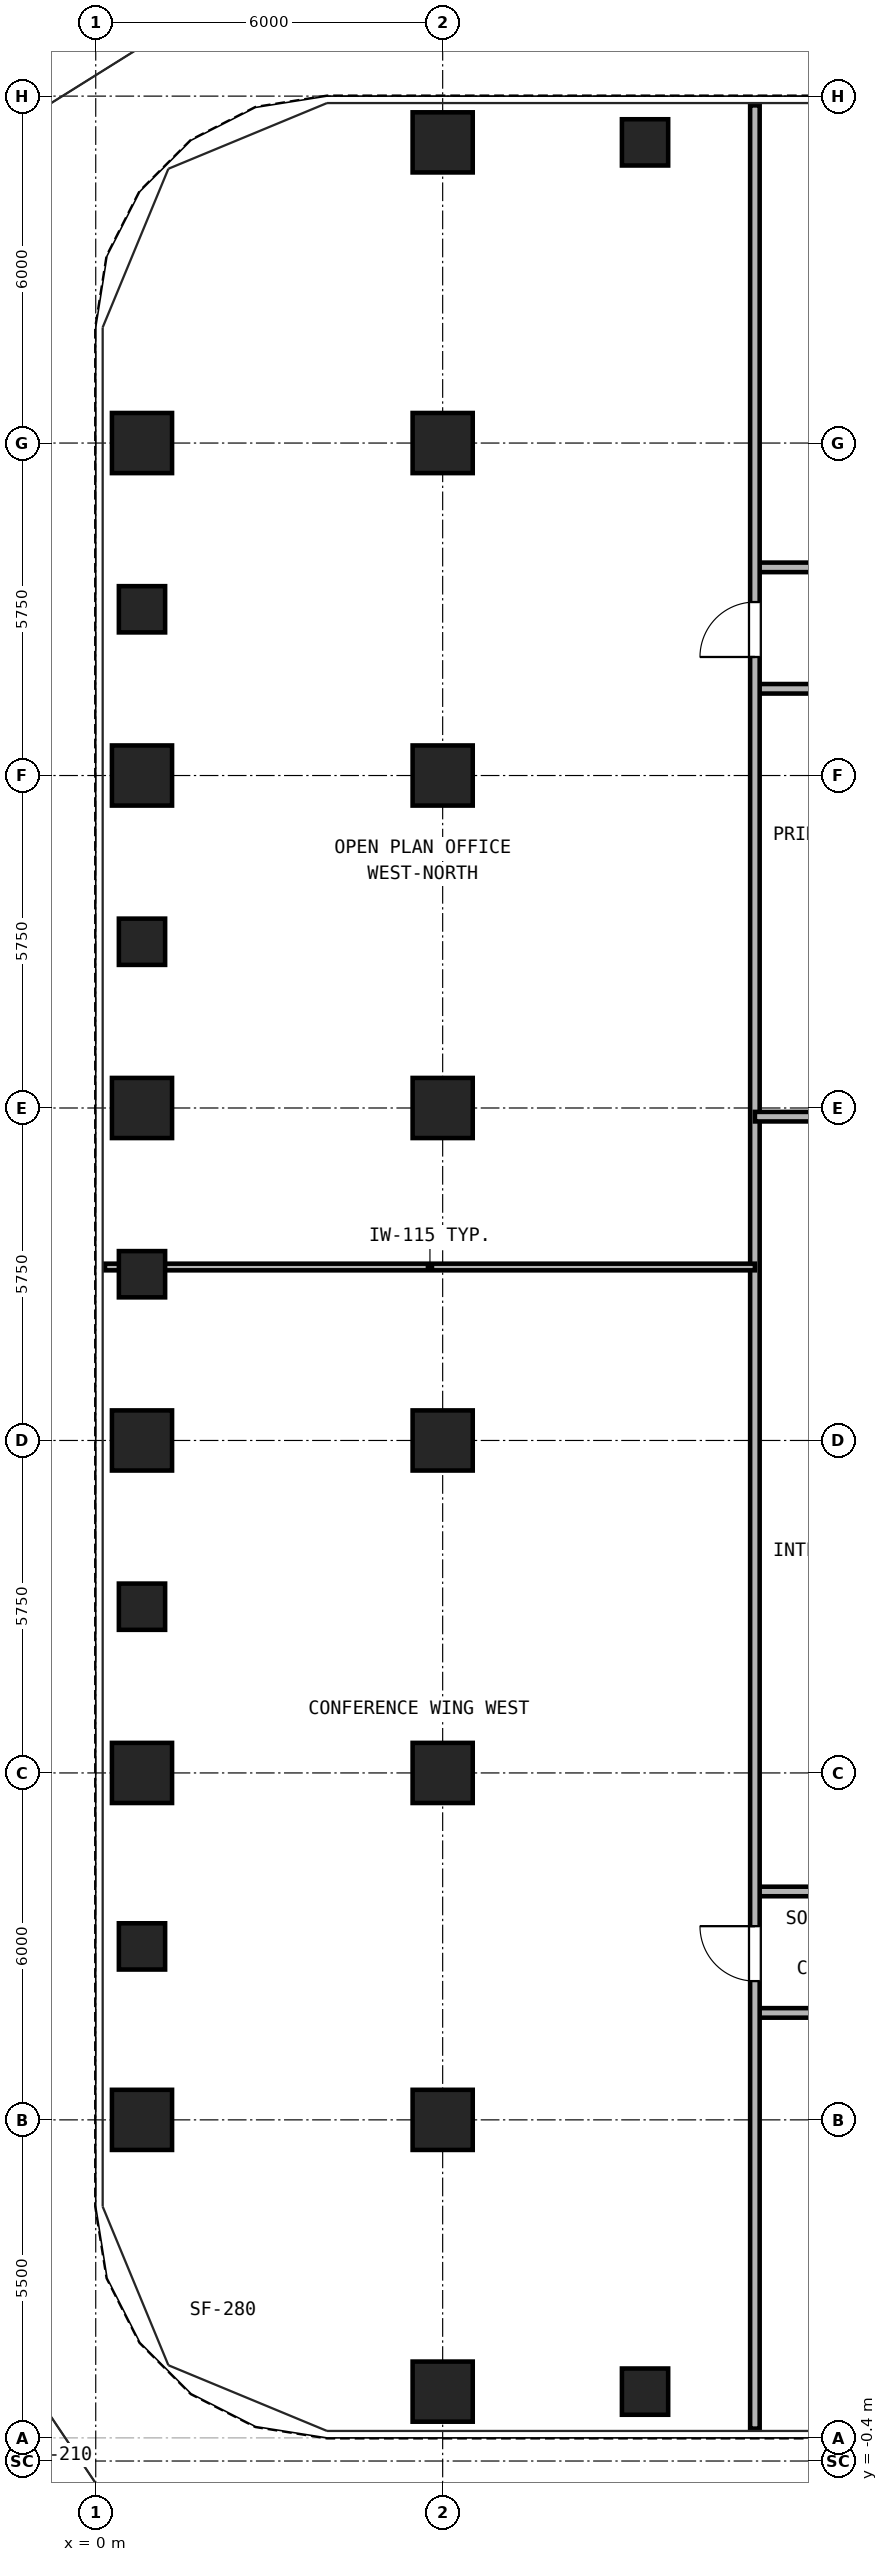
"""IFC4 building model, lengths in metres.
Left out: names, types, materials, properties, quantities, classifications, styles, units other than length and angle.
Written with IfcOpenShell. Run it as: python <this file> out.ifc"""

import sys

from ifc_helpers import new_model, si_unit, direction, frame, frame_2d, origin, origin_2d, place, context, subcontext, project, spatial, rectangle, hollow_rectangle, extrude, source, transform, mapped, element, fill, save


model = new_model("IFC4")
c1 = context("Model", 3, precision=1e-05, world=origin(), true_north=direction((0.0, 1.0)))
c2 = subcontext(c1, "Body", "Model", "MODEL_VIEW")
j1 = project(units=[si_unit("LENGTHUNIT", "METRE"), si_unit("PLANEANGLEUNIT", "RADIAN")], contexts=[c1])
p1 = place(None, origin())
s1 = spatial("IfcSite", under=j1, at=p1, CompositionType="ELEMENT")
p2 = place(p1, origin())
s2 = spatial("IfcBuilding", under=s1, at=p2, CompositionType="ELEMENT")
p3 = place(p2, frame((0.0, 0.0, 33.3)))
s3 = spatial("IfcBuildingStorey", under=s2, at=p3, CompositionType="ELEMENT", Elevation=33.3)
m1 = source(origin(), c2, "Body", "SweptSolid", [
    extrude(hollow_rectangle(XDim=1.04, YDim=1.04, WallThickness=0.065, at=origin_2d()), origin(), (0.0, 0.0, 1.0), 3.32),
])
for number, where, z_axis, x_axis in (
    (1, (6.0, 0.8, 0.0), (0.0, 0.0, 1.0), (1.0, 0.0, 0.0)),
    (2, (6.0, 39.7, 0.0), (0.0, 0.0, 1.0), (1.0, 0.0, 0.0)),
    (3, (0.8, 5.5, 0.0), (0.0, 0.0, 1.0), (1.0, 0.0, 0.0)),
    (4, (0.8, 11.5, 0.0), (0.0, 0.0, 1.0), (1.0, 0.0, 0.0)),
    (5, (0.8, 17.25, 0.0), (0.0, 0.0, 1.0), (1.0, 0.0, 0.0)),
    (6, (0.8, 23.0, 0.0), (0.0, 0.0, 1.0), (1.0, 0.0, 0.0)),
    (7, (0.8, 28.75, 0.0), (0.0, 0.0, 1.0), (1.0, 0.0, 0.0)),
    (8, (0.8, 34.5, 0.0), (0.0, 0.0, 1.0), (1.0, 0.0, 0.0)),
    (9, (6.0, 5.5, 0.0), (0.0, 0.0, 1.0), (1.0, 0.0, 0.0)),
    (10, (6.0, 11.5, 0.0), (0.0, 0.0, 1.0), (1.0, 0.0, 0.0)),
    (11, (6.0, 17.25, 0.0), (0.0, 0.0, 1.0), (1.0, 0.0, 0.0)),
    (12, (6.0, 23.0, 0.0), (0.0, 0.0, 1.0), (1.0, 0.0, 0.0)),
    (13, (6.0, 28.75, 0.0), (0.0, 0.0, 1.0), (1.0, 0.0, 0.0)),
    (14, (6.0, 34.5, 0.0), (0.0, 0.0, 1.0), (1.0, 0.0, 0.0)),
):
    element("IfcColumn", number, at=place(p3, frame(where, z_axis=z_axis, x_axis=x_axis)), inside=s3, PredefinedType="COLUMN", context=c2, shape_type="MappedRepresentation", body=[
        mapped(m1, transform((0.0, 0.0, 0.0), x_axis=(1.0, 0.0, 0.0), y_axis=(0.0, 1.0, 0.0), z_axis=(0.0, 0.0, 1.0), scale=1.0)),
    ])
m2 = source(origin(), c2, "Body", "SweptSolid", [
    extrude(hollow_rectangle(XDim=0.8, YDim=0.8, WallThickness=0.045, at=origin_2d()), origin(), (0.0, 0.0, 1.0), 3.32),
])
for number, where, z_axis, x_axis in (
    (15, (9.5, 0.8, 0.0), (0.0, 0.0, 1.0), (1.0, 0.0, 0.0)),
    (16, (9.5, 39.7, 0.0), (0.0, 0.0, 1.0), (1.0, 0.0, 0.0)),
    (17, (0.8, 8.5, 0.0), (0.0, 0.0, 1.0), (1.0, 0.0, 0.0)),
    (18, (0.8, 14.375, 0.0), (0.0, 0.0, 1.0), (1.0, 0.0, 0.0)),
    (19, (0.8, 20.125, 0.0), (0.0, 0.0, 1.0), (1.0, 0.0, 0.0)),
    (20, (0.8, 25.875, 0.0), (0.0, 0.0, 1.0), (1.0, 0.0, 0.0)),
    (21, (0.8, 31.625, 0.0), (0.0, 0.0, 1.0), (1.0, 0.0, 0.0)),
):
    element("IfcColumn", number, at=place(p3, frame(where, z_axis=z_axis, x_axis=x_axis)), inside=s3, PredefinedType="COLUMN", context=c2, shape_type="MappedRepresentation", body=[
        mapped(m2, transform((0.0, 0.0, 0.0), x_axis=(1.0, 0.0, 0.0), y_axis=(0.0, 1.0, 0.0), z_axis=(0.0, 0.0, 1.0), scale=1.0)),
    ])
p4 = place(p3, frame((11.4, 7.35, 0.0), z_axis=(0.0, 0.0, 1.0), x_axis=(1.0, 0.0, 0.0)))
e22 = element("IfcWall", 22, at=p4, inside=s3, PredefinedType="PARTITIONING", context=c2, shape_type="SweptSolid", body=[
    extrude(rectangle(XDim=24.2, YDim=0.165, at=frame_2d((12.1, 0.0))), origin(), (0.0, 0.0, 1.0), 3.32),
])
p5 = place(p4, frame((3.05, 0.0, 0.0)))
e23 = element("IfcOpeningElement", 23, at=p5, cuts=e22, PredefinedType="OPENING", context=c2, shape_type="SweptSolid", body=[
    extrude(rectangle(XDim=0.95, YDim=2.15, at=frame_2d((0.475, 1.075))), frame((0.0, 0.093, 0.0), z_axis=(0.0, -1.0, 0.0), x_axis=(1.0, 0.0, 0.0)), (0.0, 0.0, 1.0), 0.185),
])
p6 = place(p4, frame((11.6, 0.0, 0.0)))
e24 = element("IfcOpeningElement", 24, at=p6, cuts=e22, PredefinedType="OPENING", context=c2, shape_type="SweptSolid", body=[
    extrude(rectangle(XDim=0.95, YDim=2.15, at=frame_2d((0.475, 1.075))), frame((0.0, 0.093, 0.0), z_axis=(0.0, -1.0, 0.0), x_axis=(1.0, 0.0, 0.0)), (0.0, 0.0, 1.0), 0.185),
])
p7 = place(p4, frame((18.8, 0.0, 0.0)))
e25 = element("IfcOpeningElement", 25, at=p7, cuts=e22, PredefinedType="OPENING", context=c2, shape_type="SweptSolid", body=[
    extrude(rectangle(XDim=0.92, YDim=2.1, at=frame_2d((0.46, 1.05))), frame((0.0, 0.093, 0.0), z_axis=(0.0, -1.0, 0.0), x_axis=(1.0, 0.0, 0.0)), (0.0, 0.0, 1.0), 0.185),
])
p8 = place(p4, frame((22.35, 0.0, 0.0)))
e26 = element("IfcOpeningElement", 26, at=p8, cuts=e22, PredefinedType="OPENING", context=c2, shape_type="SweptSolid", body=[
    extrude(rectangle(XDim=0.92, YDim=2.1, at=frame_2d((0.46, 1.05))), frame((0.0, 0.093, 0.0), z_axis=(0.0, -1.0, 0.0), x_axis=(1.0, 0.0, 0.0)), (0.0, 0.0, 1.0), 0.185),
])
p9 = place(p3, frame((11.4, 32.35, 0.0), z_axis=(0.0, 0.0, 1.0), x_axis=(1.0, 0.0, 0.0)))
e27 = element("IfcWall", 27, at=p9, inside=s3, PredefinedType="PARTITIONING", context=c2, shape_type="SweptSolid", body=[
    extrude(rectangle(XDim=24.2, YDim=0.165, at=frame_2d((12.1, 0.0))), origin(), (0.0, 0.0, 1.0), 3.32),
])
p10 = place(p9, frame((2.7, 0.0, 0.0)))
e28 = element("IfcOpeningElement", 28, at=p10, cuts=e27, PredefinedType="OPENING", context=c2, shape_type="SweptSolid", body=[
    extrude(rectangle(XDim=0.95, YDim=2.15, at=frame_2d((0.475, 1.075))), frame((0.0, 0.093, 0.0), z_axis=(0.0, -1.0, 0.0), x_axis=(1.0, 0.0, 0.0)), (0.0, 0.0, 1.0), 0.185),
])
p11 = place(p9, frame((9.2, 0.0, 0.0)))
e29 = element("IfcOpeningElement", 29, at=p11, cuts=e27, PredefinedType="OPENING", context=c2, shape_type="SweptSolid", body=[
    extrude(rectangle(XDim=0.95, YDim=2.15, at=frame_2d((0.475, 1.075))), frame((0.0, 0.093, 0.0), z_axis=(0.0, -1.0, 0.0), x_axis=(1.0, 0.0, 0.0)), (0.0, 0.0, 1.0), 0.185),
])
p12 = place(p9, frame((15.9, 0.0, 0.0)))
e30 = element("IfcOpeningElement", 30, at=p12, cuts=e27, PredefinedType="OPENING", context=c2, shape_type="SweptSolid", body=[
    extrude(rectangle(XDim=0.95, YDim=2.15, at=frame_2d((0.475, 1.075))), frame((0.0, 0.093, 0.0), z_axis=(0.0, -1.0, 0.0), x_axis=(1.0, 0.0, 0.0)), (0.0, 0.0, 1.0), 0.185),
])
p13 = place(p9, frame((21.5, 0.0, 0.0)))
e31 = element("IfcOpeningElement", 31, at=p13, cuts=e27, PredefinedType="OPENING", context=c2, shape_type="SweptSolid", body=[
    extrude(rectangle(XDim=0.95, YDim=2.15, at=frame_2d((0.475, 1.075))), frame((0.0, 0.093, 0.0), z_axis=(0.0, -1.0, 0.0), x_axis=(1.0, 0.0, 0.0)), (0.0, 0.0, 1.0), 0.185),
])
for number, where, z_axis, x_axis in (
    (32, (11.4, 9.45, 0.0), (0.0, 0.0, 1.0), (1.0, 0.0, 0.0)),
    (33, (11.4, 30.25, 0.0), (0.0, 0.0, 1.0), (1.0, 0.0, 0.0)),
):
    element("IfcWall", number, at=place(p3, frame(where, z_axis=z_axis, x_axis=x_axis)), inside=s3, PredefinedType="PARTITIONING", context=c2, shape_type="SweptSolid", body=[
        extrude(rectangle(XDim=4.9, YDim=0.165, at=frame_2d((2.45, 0.0))), origin(), (0.0, 0.0, 1.0), 3.32),
    ])
p14 = place(p3, frame((11.4, 0.16, 0.0), z_axis=(0.0, 0.0, 1.0), x_axis=(0.0, 1.0, 0.0)))
e34 = element("IfcWall", 34, at=p14, inside=s3, PredefinedType="PARTITIONING", context=c2, shape_type="SweptSolid", body=[
    extrude(rectangle(XDim=40.18, YDim=0.165, at=frame_2d((20.09, 0.0))), origin(), (0.0, 0.0, 1.0), 3.32),
])
p15 = place(p14, frame((7.74, 0.0, 0.0)))
e35 = element("IfcOpeningElement", 35, at=p15, cuts=e34, PredefinedType="OPENING", context=c2, shape_type="SweptSolid", body=[
    extrude(rectangle(XDim=0.95, YDim=2.15, at=frame_2d((0.475, 1.075))), frame((0.0, 0.093, 0.0), z_axis=(0.0, -1.0, 0.0), x_axis=(1.0, 0.0, 0.0)), (0.0, 0.0, 1.0), 0.185),
])
p16 = place(p14, frame((30.64, 0.0, 0.0)))
e36 = element("IfcOpeningElement", 36, at=p16, cuts=e34, PredefinedType="OPENING", context=c2, shape_type="SweptSolid", body=[
    extrude(rectangle(XDim=0.95, YDim=2.15, at=frame_2d((0.475, 1.075))), frame((0.0, 0.093, 0.0), z_axis=(0.0, -1.0, 0.0), x_axis=(1.0, 0.0, 0.0)), (0.0, 0.0, 1.0), 0.185),
])
p17 = place(p3, frame((0.16, 20.25, 0.0), z_axis=(0.0, 0.0, 1.0), x_axis=(1.0, 0.0, 0.0)))
e37 = element("IfcWall", 37, at=p17, inside=s3, PredefinedType="PARTITIONING", context=c2, shape_type="SweptSolid", body=[
    extrude(rectangle(XDim=11.24, YDim=0.115, at=frame_2d((5.62, 0.0))), origin(), (0.0, 0.0, 1.0), 2.898),
])
p18 = place(p3, frame((11.4, 22.85, 0.0), z_axis=(0.0, 0.0, 1.0), x_axis=(1.0, 0.0, 0.0)))
e38 = element("IfcWall", 38, at=p18, inside=s3, PredefinedType="PARTITIONING", context=c2, shape_type="SweptSolid", body=[
    extrude(rectangle(XDim=4.9, YDim=0.165, at=frame_2d((2.45, 0.0))), origin(), (0.0, 0.0, 1.0), 2.539),
])
p19 = place(p15, frame((0.95, 0.0, 0.0), z_axis=(0.0, 0.0, 1.0), x_axis=(-1.0, 0.0, 0.0)))
e39 = element("IfcDoor", 39, at=p19, inside=s3, OperationType="SINGLE_SWING_RIGHT", PredefinedType="DOOR", context=c2, shape_type="SweptSolid", body=[
    extrude(rectangle(XDim=0.95, YDim=2.15, at=frame_2d((0.475, 1.075))), frame((0.0, 0.025, 0.0), z_axis=(0.0, -1.0, 0.0), x_axis=(1.0, 0.0, 0.0)), (0.0, 0.0, 1.0), 0.05),
])
fill(e35, e39)
p20 = place(p16, frame((0.95, 0.0, 0.0), z_axis=(0.0, 0.0, 1.0), x_axis=(-1.0, 0.0, 0.0)))
e40 = element("IfcDoor", 40, at=p20, inside=s3, OperationType="SINGLE_SWING_LEFT", PredefinedType="DOOR", context=c2, shape_type="SweptSolid", body=[
    extrude(rectangle(XDim=0.95, YDim=2.15, at=frame_2d((0.475, 1.075))), frame((0.0, 0.025, 0.0), z_axis=(0.0, -1.0, 0.0), x_axis=(1.0, 0.0, 0.0)), (0.0, 0.0, 1.0), 0.05),
])
fill(e36, e40)
save(model, sys.argv[1])
